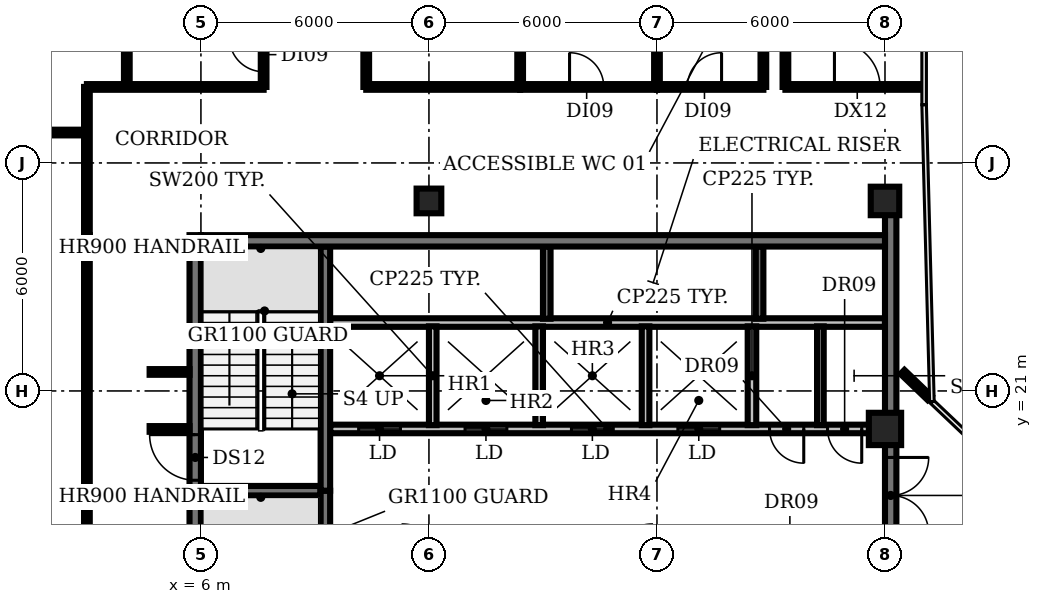
"""IFC4 building model, lengths in metres.
Left out: names, types, materials, properties, quantities, classifications, styles, units other than length and angle.
Written with IfcOpenShell. Run it as: python <this file> out.ifc"""

import sys

from ifc_helpers import new_model, si_unit, direction, frame, frame_2d, origin, origin_2d, place, context, subcontext, project, spatial, rectangle, circle, extrude, element, fill, save


model = new_model("IFC4")
c1 = context("Model", 3, precision=1e-05, world=origin(), true_north=direction((0.0, 1.0)))
c2 = subcontext(c1, "Body", "Model", "MODEL_VIEW")
j1 = project(units=[si_unit("LENGTHUNIT", "METRE"), si_unit("PLANEANGLEUNIT", "RADIAN")], contexts=[c1])
p1 = place(None, origin())
s1 = spatial("IfcSite", under=j1, at=p1, CompositionType="ELEMENT")
p2 = place(p1, origin())
s2 = spatial("IfcBuilding", under=s1, at=p2, CompositionType="ELEMENT")
p3 = place(p2, frame((0.0, 0.0, 293.6)))
s3 = spatial("IfcBuildingStorey", under=s2, at=p3, CompositionType="ELEMENT", Elevation=293.6)
p4 = place(p3, frame((12.0, 26.0, 0.0), z_axis=(0.0, 0.0, 1.0), x_axis=(1.0, 0.0, 0.0)))
e1 = element("IfcColumn", 1, at=p4, inside=s3, PredefinedType="COLUMN", context=c2, shape_type="SweptSolid", body=[
    extrude(rectangle(XDim=0.65, YDim=0.65, at=origin_2d()), origin(), (0.0, 0.0, 1.0), 3.85),
])
p5 = place(p3, frame((24.0, 20.0, 0.0), z_axis=(0.0, 0.0, 1.0), x_axis=(1.0, 0.0, 0.0)))
e2 = element("IfcColumn", 2, at=p5, inside=s3, PredefinedType="COLUMN", context=c2, shape_type="SweptSolid", body=[
    extrude(circle(Radius=0.425, at=origin_2d()), origin(), (0.0, 0.0, 1.0), 3.85),
])
p6 = place(p3, frame((24.0, 26.0, 0.0), z_axis=(0.0, 0.0, 1.0), x_axis=(1.0, 0.0, 0.0)))
e3 = element("IfcColumn", 3, at=p6, inside=s3, PredefinedType="COLUMN", context=c2, shape_type="SweptSolid", body=[
    extrude(rectangle(XDim=0.75, YDim=0.75, at=origin_2d()), origin(), (0.0, 0.0, 1.0), 3.85),
])
p7 = place(p3, frame((6.0, 18.375, 0.0), z_axis=(0.0, 0.0, 1.0), x_axis=(1.0, 0.0, 0.0)))
e4 = element("IfcWall", 4, at=p7, inside=s3, PredefinedType="SHEAR", context=c2, shape_type="SweptSolid", body=[
    extrude(rectangle(XDim=3.15, YDim=0.25, at=frame_2d((1.575, 0.0))), origin(), (0.0, 0.0, 1.0), 3.85),
])
p8 = place(p3, frame((24.0, 20.0, 0.0), z_axis=(0.0, 0.0, 1.0), x_axis=(-1.0, 0.0, 0.0)))
e5 = element("IfcWall", 5, at=p8, inside=s3, PredefinedType="PARTITIONING", context=c2, shape_type="SweptSolid", body=[
    extrude(rectangle(XDim=14.6, YDim=0.225, at=frame_2d((7.3, 0.0))), origin(), (0.0, 0.0, 1.0), 3.85),
])
p9 = place(p8, frame((12.75, 0.0, 0.0)))
e6 = element("IfcOpeningElement", 6, at=p9, cuts=e5, PredefinedType="OPENING", context=c2, shape_type="SweptSolid", body=[
    extrude(rectangle(XDim=1.1, YDim=2.1, at=frame_2d((0.55, 1.05))), frame((0.0, 0.123, 0.0), z_axis=(0.0, -1.0, 0.0), x_axis=(1.0, 0.0, 0.0)), (0.0, 0.0, 1.0), 0.245),
])
p10 = place(p8, frame((9.95, 0.0, 0.0)))
e7 = element("IfcOpeningElement", 7, at=p10, cuts=e5, PredefinedType="OPENING", context=c2, shape_type="SweptSolid", body=[
    extrude(rectangle(XDim=1.1, YDim=2.1, at=frame_2d((0.55, 1.05))), frame((0.0, 0.123, 0.0), z_axis=(0.0, -1.0, 0.0), x_axis=(1.0, 0.0, 0.0)), (0.0, 0.0, 1.0), 0.245),
])
p11 = place(p8, frame((7.15, 0.0, 0.0)))
e8 = element("IfcOpeningElement", 8, at=p11, cuts=e5, PredefinedType="OPENING", context=c2, shape_type="SweptSolid", body=[
    extrude(rectangle(XDim=1.1, YDim=2.1, at=frame_2d((0.55, 1.05))), frame((0.0, 0.123, 0.0), z_axis=(0.0, -1.0, 0.0), x_axis=(1.0, 0.0, 0.0)), (0.0, 0.0, 1.0), 0.245),
])
p12 = place(p8, frame((4.35, 0.0, 0.0)))
e9 = element("IfcOpeningElement", 9, at=p12, cuts=e5, PredefinedType="OPENING", context=c2, shape_type="SweptSolid", body=[
    extrude(rectangle(XDim=1.1, YDim=2.1, at=frame_2d((0.55, 1.05))), frame((0.0, 0.123, 0.0), z_axis=(0.0, -1.0, 0.0), x_axis=(1.0, 0.0, 0.0)), (0.0, 0.0, 1.0), 0.245),
])
p13 = place(p8, frame((2.137, 0.0, 0.0)))
e10 = element("IfcOpeningElement", 10, at=p13, cuts=e5, PredefinedType="OPENING", context=c2, shape_type="SweptSolid", body=[
    extrude(rectangle(XDim=0.9, YDim=2.1, at=frame_2d((0.45, 1.05))), frame((0.0, 0.123, 0.0), z_axis=(0.0, -1.0, 0.0), x_axis=(1.0, 0.0, 0.0)), (0.0, 0.0, 1.0), 0.245),
])
p14 = place(p8, frame((0.612, 0.0, 0.0)))
e11 = element("IfcOpeningElement", 11, at=p14, cuts=e5, PredefinedType="OPENING", context=c2, shape_type="SweptSolid", body=[
    extrude(rectangle(XDim=0.9, YDim=2.1, at=frame_2d((0.45, 1.05))), frame((0.0, 0.123, 0.0), z_axis=(0.0, -1.0, 0.0), x_axis=(1.0, 0.0, 0.0)), (0.0, 0.0, 1.0), 0.245),
])
p15 = place(p3, frame((9.4, 22.8, 0.0), z_axis=(0.0, 0.0, 1.0), x_axis=(1.0, 0.0, 0.0)))
e12 = element("IfcWall", 12, at=p15, inside=s3, PredefinedType="PARTITIONING", context=c2, shape_type="SweptSolid", body=[
    extrude(rectangle(XDim=14.6, YDim=0.225, at=frame_2d((7.3, 0.0))), origin(), (0.0, 0.0, 1.0), 3.85),
])
p16 = place(p3, frame((9.275, 18.375, 0.0), z_axis=(0.0, 0.0, 1.0), x_axis=(0.0, -1.0, 0.0)))
e13 = element("IfcWall", 13, at=p16, inside=s3, PredefinedType="SHEAR", context=c2, shape_type="SweptSolid", body=[
    extrude(rectangle(XDim=6.55, YDim=0.25, at=frame_2d((3.275, 0.0))), origin(), (0.0, 0.0, 1.0), 3.85),
])
p17 = place(p16, frame((5.075, 0.0, 0.0)))
e14 = element("IfcOpeningElement", 14, at=p17, cuts=e13, PredefinedType="OPENING", context=c2, shape_type="SweptSolid", body=[
    extrude(rectangle(XDim=1.0, YDim=2.1, at=frame_2d((0.5, 1.05))), frame((0.0, 0.135, 0.0), z_axis=(0.0, -1.0, 0.0), x_axis=(1.0, 0.0, 0.0)), (0.0, 0.0, 1.0), 0.27),
])
p18 = place(p3, frame((9.275, 18.375, 0.0), z_axis=(0.0, 0.0, 1.0), x_axis=(0.0, 1.0, 0.0)))
e15 = element("IfcWall", 15, at=p18, inside=s3, PredefinedType="SHEAR", context=c2, shape_type="SweptSolid", body=[
    extrude(rectangle(XDim=6.425, YDim=0.25, at=frame_2d((3.212, 0.0))), origin(), (0.0, 0.0, 1.0), 3.85),
])
for number, where, z_axis, x_axis in (
    (16, (12.1, 20.1, 0.0), (0.0, 0.0, 1.0), (0.0, 1.0, 0.0)),
    (17, (14.9, 20.1, 0.0), (0.0, 0.0, 1.0), (0.0, 1.0, 0.0)),
):
    element("IfcWall", number, at=place(p3, frame(where, z_axis=z_axis, x_axis=x_axis)), inside=s3, PredefinedType="SOLIDWALL", context=c2, shape_type="SweptSolid", body=[
        extrude(rectangle(XDim=2.6, YDim=0.2, at=frame_2d((1.3, 0.0))), origin(), (0.0, 0.0, 1.0), 3.85),
    ])
p19 = place(p3, frame((15.1, 22.9, 0.0), z_axis=(0.0, 0.0, 1.0), x_axis=(0.0, 1.0, 0.0)))
e18 = element("IfcWall", 18, at=p19, inside=s3, PredefinedType="SHEAR", context=c2, shape_type="SweptSolid", body=[
    extrude(rectangle(XDim=1.9, YDim=0.2, at=frame_2d((0.95, 0.0))), origin(), (0.0, 0.0, 1.0), 3.85),
])
p20 = place(p3, frame((17.7, 20.1, 0.0), z_axis=(0.0, 0.0, 1.0), x_axis=(0.0, 1.0, 0.0)))
e19 = element("IfcWall", 19, at=p20, inside=s3, PredefinedType="SOLIDWALL", context=c2, shape_type="SweptSolid", body=[
    extrude(rectangle(XDim=2.6, YDim=0.2, at=frame_2d((1.3, 0.0))), origin(), (0.0, 0.0, 1.0), 3.85),
])
p21 = place(p3, frame((20.5, 20.1, 0.0), z_axis=(0.0, 0.0, 1.0), x_axis=(0.0, 1.0, 0.0)))
e20 = element("IfcWall", 20, at=p21, inside=s3, PredefinedType="PARTITIONING", context=c2, shape_type="SweptSolid", body=[
    extrude(rectangle(XDim=2.6, YDim=0.225, at=frame_2d((1.3, 0.0))), origin(), (0.0, 0.0, 1.0), 3.85),
])
p22 = place(p3, frame((20.7, 22.9, 0.0), z_axis=(0.0, 0.0, 1.0), x_axis=(0.0, 1.0, 0.0)))
e21 = element("IfcWall", 21, at=p22, inside=s3, PredefinedType="SHEAR", context=c2, shape_type="SweptSolid", body=[
    extrude(rectangle(XDim=1.9, YDim=0.2, at=frame_2d((0.95, 0.0))), origin(), (0.0, 0.0, 1.0), 3.85),
])
p23 = place(p3, frame((22.3, 20.1, 0.0), z_axis=(0.0, 0.0, 1.0), x_axis=(0.0, 1.0, 0.0)))
e22 = element("IfcWall", 22, at=p23, inside=s3, PredefinedType="PARTITIONING", context=c2, shape_type="SweptSolid", body=[
    extrude(rectangle(XDim=2.6, YDim=0.175, at=frame_2d((1.3, 0.0))), origin(), (0.0, 0.0, 1.0), 3.85),
])
p24 = place(p3, frame((5.85, 5.1, 0.0), z_axis=(0.0, 0.0, 1.0), x_axis=(0.0, 1.0, 0.0)))
e23 = element("IfcWall", 23, at=p24, inside=s3, PredefinedType="SHEAR", context=c2, shape_type="SweptSolid", body=[
    extrude(rectangle(XDim=20.0, YDim=0.3, at=frame_2d((10.0, 0.0))), origin(), (0.0, 0.0, 1.0), 3.85),
])
p25 = place(p24, frame((0.55, 0.0, 0.0)))
e24 = element("IfcOpeningElement", 24, at=p25, cuts=e23, PredefinedType="OPENING", context=c2, shape_type="SweptSolid", body=[
    extrude(rectangle(XDim=1.5, YDim=2.1, at=frame_2d((0.75, 1.05))), frame((0.0, 0.16, 0.0), z_axis=(0.0, -1.0, 0.0), x_axis=(1.0, 0.0, 0.0)), (0.0, 0.0, 1.0), 0.32),
])
p26 = place(p24, frame((7.0, 0.0, 0.0)))
e25 = element("IfcOpeningElement", 25, at=p26, cuts=e23, PredefinedType="OPENING", context=c2, shape_type="SweptSolid", body=[
    extrude(rectangle(XDim=1.2, YDim=2.1, at=frame_2d((0.6, 1.05))), frame((0.0, 0.16, 0.0), z_axis=(0.0, -1.0, 0.0), x_axis=(1.0, 0.0, 0.0)), (0.0, 0.0, 1.0), 0.32),
])
p27 = place(p24, frame((13.55, 0.0, 0.0)))
e26 = element("IfcOpeningElement", 26, at=p27, cuts=e23, PredefinedType="OPENING", context=c2, shape_type="SweptSolid", body=[
    extrude(rectangle(XDim=1.2, YDim=2.1, at=frame_2d((0.6, 1.05))), frame((0.0, 0.16, 0.0), z_axis=(0.0, -1.0, 0.0), x_axis=(1.0, 0.0, 0.0)), (0.0, 0.0, 1.0), 0.32),
])
p28 = place(p3, frame((24.15, 25.655, 0.0), z_axis=(0.0, 0.0, 1.0), x_axis=(0.0, -1.0, 0.0)))
e27 = element("IfcWall", 27, at=p28, inside=s3, PredefinedType="SHEAR", context=c2, shape_type="SweptSolid", body=[
    extrude(rectangle(XDim=20.555, YDim=0.3, at=frame_2d((10.277, 0.0))), origin(), (0.0, 0.0, 1.0), 3.85),
])
p29 = place(p28, frame((18.505, 0.0, 0.0)))
e28 = element("IfcOpeningElement", 28, at=p29, cuts=e27, PredefinedType="OPENING", context=c2, shape_type="SweptSolid", body=[
    extrude(rectangle(XDim=1.5, YDim=2.1, at=frame_2d((0.75, 1.05))), frame((0.0, 0.16, 0.0), z_axis=(0.0, -1.0, 0.0), x_axis=(1.0, 0.0, 0.0)), (0.0, 0.0, 1.0), 0.32),
])
p30 = place(p28, frame((12.405, 0.0, 0.0)))
e29 = element("IfcOpeningElement", 29, at=p30, cuts=e27, PredefinedType="OPENING", context=c2, shape_type="SweptSolid", body=[
    extrude(rectangle(XDim=0.9, YDim=2.1, at=frame_2d((0.45, 1.05))), frame((0.0, 0.16, 0.0), z_axis=(0.0, -1.0, 0.0), x_axis=(1.0, 0.0, 0.0)), (0.0, 0.0, 1.0), 0.32),
])
p31 = place(p28, frame((6.405, 0.0, 0.0)))
e30 = element("IfcOpeningElement", 30, at=p31, cuts=e27, PredefinedType="OPENING", context=c2, shape_type="SweptSolid", body=[
    extrude(rectangle(XDim=2.0, YDim=2.1, at=frame_2d((1.0, 1.05))), frame((0.0, 0.16, 0.0), z_axis=(0.0, -1.0, 0.0), x_axis=(1.0, 0.0, 0.0)), (0.0, 0.0, 1.0), 0.32),
])
p32 = place(p3, frame((6.0, 24.95, 0.0), z_axis=(0.0, 0.0, 1.0), x_axis=(1.0, 0.0, 0.0)))
e31 = element("IfcWall", 31, at=p32, inside=s3, PredefinedType="SHEAR", context=c2, shape_type="SweptSolid", body=[
    extrude(rectangle(XDim=18.0, YDim=0.3, at=frame_2d((9.0, 0.0))), origin(), (0.0, 0.0, 1.0), 3.85),
])
p33 = place(p3, frame((-0.98, 27.8, 0.0), z_axis=(0.0, 0.0, 1.0), x_axis=(1.0, 0.0, 0.0)))
e32 = element("IfcWall", 32, at=p33, inside=s3, PredefinedType="PARTITIONING", context=c2, shape_type="SweptSolid", body=[
    extrude(rectangle(XDim=3.98, YDim=0.15, at=frame_2d((1.99, 0.0))), origin(), (0.0, 0.0, 1.0), 2.9),
])
p34 = place(p3, frame((3.0, 5.1, 0.0), z_axis=(0.0, 0.0, 1.0), x_axis=(0.0, 1.0, 0.0)))
e33 = element("IfcWall", 33, at=p34, inside=s3, PredefinedType="PARTITIONING", context=c2, shape_type="SweptSolid", body=[
    extrude(rectangle(XDim=20.0, YDim=0.15, at=frame_2d((10.0, 0.0))), origin(), (0.0, 0.0, 1.0), 2.9),
])
p35 = place(p34, frame((9.3, 0.0, 0.0)))
e34 = element("IfcOpeningElement", 34, at=p35, cuts=e33, PredefinedType="OPENING", context=c2, shape_type="SweptSolid", body=[
    extrude(rectangle(XDim=1.2, YDim=2.1, at=frame_2d((0.6, 1.05))), frame((0.0, 0.085, 0.0), z_axis=(0.0, -1.0, 0.0), x_axis=(1.0, 0.0, 0.0)), (0.0, 0.0, 1.0), 0.17),
])
p36 = place(p3, frame((3.0, 25.1, 0.0), z_axis=(0.0, 0.0, 1.0), x_axis=(0.0, 1.0, 0.0)))
e35 = element("IfcWall", 35, at=p36, inside=s3, PredefinedType="PARTITIONING", context=c2, shape_type="SweptSolid", body=[
    extrude(rectangle(XDim=3.9, YDim=0.15, at=frame_2d((1.95, 0.0))), origin(), (0.0, 0.0, 1.0), 2.9),
])
p37 = place(p3, frame((3.0, 29.0, 0.0), z_axis=(0.0, 0.0, 1.0), x_axis=(1.0, 0.0, 0.0)))
e36 = element("IfcWall", 36, at=p37, inside=s3, PredefinedType="PARTITIONING", context=c2, shape_type="SweptSolid", body=[
    extrude(rectangle(XDim=4.65, YDim=0.15, at=frame_2d((2.325, 0.0))), origin(), (0.0, 0.0, 1.0), 2.9),
])
p38 = place(p3, frame((4.05, 29.0, 0.0), z_axis=(0.0, 0.0, 1.0), x_axis=(0.0, 1.0, 0.0)))
e37 = element("IfcWall", 37, at=p38, inside=s3, PredefinedType="PARTITIONING", context=c2, shape_type="SweptSolid", body=[
    extrude(rectangle(XDim=4.8, YDim=0.15, at=frame_2d((2.4, 0.0))), origin(), (0.0, 0.0, 1.0), 2.9),
])
for number, where, z_axis, x_axis in (
    (38, (4.65, 20.0, 0.0), (0.0, 0.0, 1.0), (1.0, 0.0, 0.0)),
    (39, (4.65, 21.5, 0.0), (0.0, 0.0, 1.0), (1.0, 0.0, 0.0)),
):
    element("IfcWall", number, at=place(p3, frame(where, z_axis=z_axis, x_axis=x_axis)), inside=s3, PredefinedType="PARTITIONING", context=c2, shape_type="SweptSolid", body=[
        extrude(rectangle(XDim=1.05, YDim=0.15, at=frame_2d((0.525, 0.0))), origin(), (0.0, 0.0, 1.0), 2.9),
    ])
p39 = place(p3, frame((7.65, 29.0, 0.0), z_axis=(0.0, 0.0, 1.0), x_axis=(0.0, 1.0, 0.0)))
e40 = element("IfcWall", 40, at=p39, inside=s3, PredefinedType="PARTITIONING", context=c2, shape_type="SweptSolid", body=[
    extrude(rectangle(XDim=4.8, YDim=0.15, at=frame_2d((2.4, 0.0))), origin(), (0.0, 0.0, 1.0), 2.9),
])
p40 = place(p39, frame((0.4, 0.0, 0.0)))
e41 = element("IfcOpeningElement", 41, at=p40, cuts=e40, PredefinedType="OPENING", context=c2, shape_type="SweptSolid", body=[
    extrude(rectangle(XDim=0.9, YDim=2.1, at=frame_2d((0.45, 1.05))), frame((0.0, 0.085, 0.0), z_axis=(0.0, -1.0, 0.0), x_axis=(1.0, 0.0, 0.0)), (0.0, 0.0, 1.0), 0.17),
])
p41 = place(p3, frame((10.35, 29.0, 0.0), z_axis=(0.0, 0.0, 1.0), x_axis=(0.0, 1.0, 0.0)))
e42 = element("IfcWall", 42, at=p41, inside=s3, PredefinedType="PARTITIONING", context=c2, shape_type="SweptSolid", body=[
    extrude(rectangle(XDim=4.8, YDim=0.15, at=frame_2d((2.4, 0.0))), origin(), (0.0, 0.0, 1.0), 2.9),
])
p42 = place(p3, frame((10.35, 29.0, 0.0), z_axis=(0.0, 0.0, 1.0), x_axis=(1.0, 0.0, 0.0)))
e43 = element("IfcWall", 43, at=p42, inside=s3, PredefinedType="PARTITIONING", context=c2, shape_type="SweptSolid", body=[
    extrude(rectangle(XDim=4.05, YDim=0.15, at=frame_2d((2.025, 0.0))), origin(), (0.0, 0.0, 1.0), 2.9),
])
p43 = place(p3, frame((14.4, 29.0, 0.0), z_axis=(0.0, 0.0, 1.0), x_axis=(0.0, 1.0, 0.0)))
e44 = element("IfcWall", 44, at=p43, inside=s3, PredefinedType="PARTITIONING", context=c2, shape_type="SweptSolid", body=[
    extrude(rectangle(XDim=4.8, YDim=0.15, at=frame_2d((2.4, 0.0))), origin(), (0.0, 0.0, 1.0), 2.9),
])
p44 = place(p3, frame((14.4, 29.0, 0.0), z_axis=(0.0, 0.0, 1.0), x_axis=(1.0, 0.0, 0.0)))
e45 = element("IfcWall", 45, at=p44, inside=s3, PredefinedType="PARTITIONING", context=c2, shape_type="SweptSolid", body=[
    extrude(rectangle(XDim=3.6, YDim=0.15, at=frame_2d((1.8, 0.0))), origin(), (0.0, 0.0, 1.0), 2.9),
])
p45 = place(p44, frame((1.3, 0.0, 0.0)))
e46 = element("IfcOpeningElement", 46, at=p45, cuts=e45, PredefinedType="OPENING", context=c2, shape_type="SweptSolid", body=[
    extrude(rectangle(XDim=0.9, YDim=2.1, at=frame_2d((0.45, 1.05))), frame((0.0, 0.085, 0.0), z_axis=(0.0, -1.0, 0.0), x_axis=(1.0, 0.0, 0.0)), (0.0, 0.0, 1.0), 0.17),
])
p46 = place(p3, frame((18.0, 29.0, 0.0), z_axis=(0.0, 0.0, 1.0), x_axis=(0.0, 1.0, 0.0)))
e47 = element("IfcWall", 47, at=p46, inside=s3, PredefinedType="PARTITIONING", context=c2, shape_type="SweptSolid", body=[
    extrude(rectangle(XDim=4.8, YDim=0.15, at=frame_2d((2.4, 0.0))), origin(), (0.0, 0.0, 1.0), 2.9),
])
p47 = place(p3, frame((18.0, 29.0, 0.0), z_axis=(0.0, 0.0, 1.0), x_axis=(1.0, 0.0, 0.0)))
e48 = element("IfcWall", 48, at=p47, inside=s3, PredefinedType="PARTITIONING", context=c2, shape_type="SweptSolid", body=[
    extrude(rectangle(XDim=2.8, YDim=0.15, at=frame_2d((1.4, 0.0))), origin(), (0.0, 0.0, 1.0), 2.9),
])
p48 = place(p47, frame((0.8, 0.0, 0.0)))
e49 = element("IfcOpeningElement", 49, at=p48, cuts=e48, PredefinedType="OPENING", context=c2, shape_type="SweptSolid", body=[
    extrude(rectangle(XDim=0.9, YDim=2.1, at=frame_2d((0.45, 1.05))), frame((0.0, 0.085, 0.0), z_axis=(0.0, -1.0, 0.0), x_axis=(1.0, 0.0, 0.0)), (0.0, 0.0, 1.0), 0.17),
])
for number, where, z_axis, x_axis in (
    (50, (20.8, 29.0, 0.0), (0.0, 0.0, 1.0), (0.0, 1.0, 0.0)),
    (51, (21.38, 29.0, 0.0), (0.0, 0.0, 1.0), (0.0, 1.0, 0.0)),
):
    element("IfcWall", number, at=place(p3, frame(where, z_axis=z_axis, x_axis=x_axis)), inside=s3, PredefinedType="PARTITIONING", context=c2, shape_type="SweptSolid", body=[
        extrude(rectangle(XDim=4.8, YDim=0.15, at=frame_2d((2.4, 0.0))), origin(), (0.0, 0.0, 1.0), 2.9),
    ])
p49 = place(p3, frame((21.38, 29.0, 0.0), z_axis=(0.0, 0.0, 1.0), x_axis=(1.0, 0.0, 0.0)))
e52 = element("IfcWall", 52, at=p49, inside=s3, PredefinedType="PARTITIONING", context=c2, shape_type="SweptSolid", body=[
    extrude(rectangle(XDim=3.59, YDim=0.15, at=frame_2d((1.795, 0.0))), origin(), (0.0, 0.0, 1.0), 2.9),
])
p50 = place(p49, frame((1.29, 0.0, 0.0)))
e53 = element("IfcOpeningElement", 53, at=p50, cuts=e52, PredefinedType="OPENING", context=c2, shape_type="SweptSolid", body=[
    extrude(rectangle(XDim=1.2, YDim=2.1, at=frame_2d((0.6, 1.05))), frame((0.0, 0.085, 0.0), z_axis=(0.0, -1.0, 0.0), x_axis=(1.0, 0.0, 0.0)), (0.0, 0.0, 1.0), 0.17),
])
p51 = place(p3, frame((24.46, 21.5, 0.0), z_axis=(0.0, 0.0, 1.0), x_axis=(0.720809322513, -0.69313340749, 0.0)))
e54 = element("IfcWall", 54, at=p51, inside=s3, PredefinedType="PARTITIONING", context=c2, shape_type="SweptSolid", body=[
    extrude(rectangle(XDim=0.988, YDim=0.15, at=frame_2d((0.494, 0.0))), origin(), (0.0, 0.0, 1.0), 2.9),
])
p52 = place(p9, origin())
e55 = element("IfcDoor", 55, at=p52, inside=s3, OperationType="DOUBLE_DOOR_SLIDING", PredefinedType="DOOR", context=c2, shape_type="SweptSolid", body=[
    extrude(rectangle(XDim=1.1, YDim=2.1, at=frame_2d((0.55, 1.05))), frame((0.0, 0.025, 0.0), z_axis=(0.0, -1.0, 0.0), x_axis=(1.0, 0.0, 0.0)), (0.0, 0.0, 1.0), 0.05),
])
fill(e6, e55)
p53 = place(p10, origin())
e56 = element("IfcDoor", 56, at=p53, inside=s3, OperationType="DOUBLE_DOOR_SLIDING", PredefinedType="DOOR", context=c2, shape_type="SweptSolid", body=[
    extrude(rectangle(XDim=1.1, YDim=2.1, at=frame_2d((0.55, 1.05))), frame((0.0, 0.025, 0.0), z_axis=(0.0, -1.0, 0.0), x_axis=(1.0, 0.0, 0.0)), (0.0, 0.0, 1.0), 0.05),
])
fill(e7, e56)
p54 = place(p11, origin())
e57 = element("IfcDoor", 57, at=p54, inside=s3, OperationType="DOUBLE_DOOR_SLIDING", PredefinedType="DOOR", context=c2, shape_type="SweptSolid", body=[
    extrude(rectangle(XDim=1.1, YDim=2.1, at=frame_2d((0.55, 1.05))), frame((0.0, 0.025, 0.0), z_axis=(0.0, -1.0, 0.0), x_axis=(1.0, 0.0, 0.0)), (0.0, 0.0, 1.0), 0.05),
])
fill(e8, e57)
p55 = place(p12, origin())
e58 = element("IfcDoor", 58, at=p55, inside=s3, OperationType="DOUBLE_DOOR_SLIDING", PredefinedType="DOOR", context=c2, shape_type="SweptSolid", body=[
    extrude(rectangle(XDim=1.1, YDim=2.1, at=frame_2d((0.55, 1.05))), frame((0.0, 0.025, 0.0), z_axis=(0.0, -1.0, 0.0), x_axis=(1.0, 0.0, 0.0)), (0.0, 0.0, 1.0), 0.05),
])
fill(e9, e58)
p56 = place(p13, origin())
e59 = element("IfcDoor", 59, at=p56, inside=s3, OperationType="SINGLE_SWING_LEFT", PredefinedType="DOOR", context=c2, shape_type="SweptSolid", body=[
    extrude(rectangle(XDim=0.9, YDim=2.1, at=frame_2d((0.45, 1.05))), frame((0.0, 0.025, 0.0), z_axis=(0.0, -1.0, 0.0), x_axis=(1.0, 0.0, 0.0)), (0.0, 0.0, 1.0), 0.05),
])
fill(e10, e59)
p57 = place(p14, origin())
e60 = element("IfcDoor", 60, at=p57, inside=s3, OperationType="SINGLE_SWING_LEFT", PredefinedType="DOOR", context=c2, shape_type="SweptSolid", body=[
    extrude(rectangle(XDim=0.9, YDim=2.1, at=frame_2d((0.45, 1.05))), frame((0.0, 0.025, 0.0), z_axis=(0.0, -1.0, 0.0), x_axis=(1.0, 0.0, 0.0)), (0.0, 0.0, 1.0), 0.05),
])
fill(e11, e60)
p58 = place(p27, origin())
e61 = element("IfcDoor", 61, at=p58, inside=s3, OperationType="SINGLE_SWING_RIGHT", PredefinedType="DOOR", context=c2, shape_type="SweptSolid", body=[
    extrude(rectangle(XDim=1.2, YDim=2.1, at=frame_2d((0.6, 1.05))), frame((0.0, 0.025, 0.0), z_axis=(0.0, -1.0, 0.0), x_axis=(1.0, 0.0, 0.0)), (0.0, 0.0, 1.0), 0.05),
])
fill(e26, e61)
p59 = place(p31, origin())
e62 = element("IfcDoor", 62, at=p59, inside=s3, OperationType="DOUBLE_DOOR_SINGLE_SWING", PredefinedType="DOOR", context=c2, shape_type="SweptSolid", body=[
    extrude(rectangle(XDim=2.0, YDim=2.1, at=frame_2d((1.0, 1.05))), frame((0.0, 0.025, 0.0), z_axis=(0.0, -1.0, 0.0), x_axis=(1.0, 0.0, 0.0)), (0.0, 0.0, 1.0), 0.05),
])
fill(e30, e62)
p60 = place(p40, origin())
e63 = element("IfcDoor", 63, at=p60, inside=s3, OperationType="SINGLE_SWING_RIGHT", PredefinedType="DOOR", context=c2, shape_type="SweptSolid", body=[
    extrude(rectangle(XDim=0.9, YDim=2.1, at=frame_2d((0.45, 1.05))), frame((0.0, 0.025, 0.0), z_axis=(0.0, -1.0, 0.0), x_axis=(1.0, 0.0, 0.0)), (0.0, 0.0, 1.0), 0.05),
])
fill(e41, e63)
p61 = place(p45, origin())
e64 = element("IfcDoor", 64, at=p61, inside=s3, OperationType="SINGLE_SWING_LEFT", PredefinedType="DOOR", context=c2, shape_type="SweptSolid", body=[
    extrude(rectangle(XDim=0.9, YDim=2.1, at=frame_2d((0.45, 1.05))), frame((0.0, 0.025, 0.0), z_axis=(0.0, -1.0, 0.0), x_axis=(1.0, 0.0, 0.0)), (0.0, 0.0, 1.0), 0.05),
])
fill(e46, e64)
p62 = place(p48, origin())
e65 = element("IfcDoor", 65, at=p62, inside=s3, OperationType="SINGLE_SWING_RIGHT", PredefinedType="DOOR", context=c2, shape_type="SweptSolid", body=[
    extrude(rectangle(XDim=0.9, YDim=2.1, at=frame_2d((0.45, 1.05))), frame((0.0, 0.025, 0.0), z_axis=(0.0, -1.0, 0.0), x_axis=(1.0, 0.0, 0.0)), (0.0, 0.0, 1.0), 0.05),
])
fill(e49, e65)
p63 = place(p50, origin())
e66 = element("IfcDoor", 66, at=p63, inside=s3, OperationType="SINGLE_SWING_LEFT", PredefinedType="DOOR", context=c2, shape_type="SweptSolid", body=[
    extrude(rectangle(XDim=1.2, YDim=2.1, at=frame_2d((0.6, 1.05))), frame((0.0, 0.025, 0.0), z_axis=(0.0, -1.0, 0.0), x_axis=(1.0, 0.0, 0.0)), (0.0, 0.0, 1.0), 0.05),
])
fill(e53, e66)
save(model, sys.argv[1])
